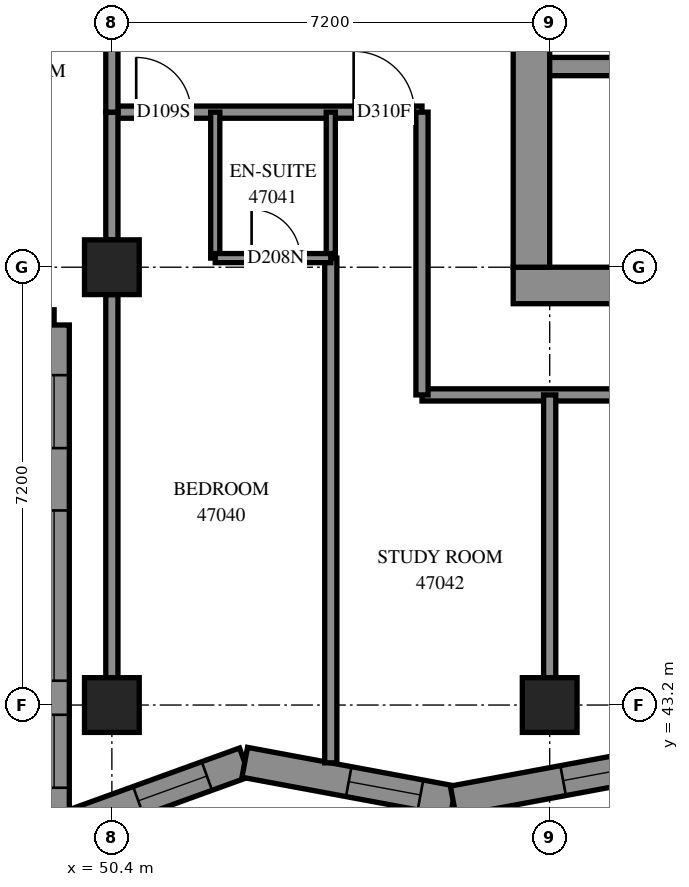
"""IFC4 building model, lengths in metres.
Left out: names, types, materials, properties, quantities, classifications, styles, units other than length and angle.
Written with IfcOpenShell. Run it as: python <this file> out.ifc"""

import sys

from ifc_helpers import new_model, si_unit, direction, frame, frame_2d, origin, origin_2d, place, context, subcontext, project, spatial, polyline, rectangle, outline, extrude, element, fill, save


model = new_model("IFC4")
c1 = context("Model", 3, precision=1e-05, world=origin(), true_north=direction((0.0, 1.0)))
c2 = subcontext(c1, "Body", "Model", "MODEL_VIEW")
j1 = project(units=[si_unit("LENGTHUNIT", "METRE"), si_unit("PLANEANGLEUNIT", "RADIAN")], contexts=[c1])
p1 = place(None, origin())
s1 = spatial("IfcSite", under=j1, at=p1, CompositionType="ELEMENT")
p2 = place(p1, origin())
s2 = spatial("IfcBuilding", under=s1, at=p2, CompositionType="ELEMENT")
p3 = place(p2, frame((0.0, 0.0, 172.8)))
s3 = spatial("IfcBuildingStorey", under=s2, at=p3, CompositionType="ELEMENT", Elevation=172.8)
for number, where, z_axis, x_axis in (
    (1, (50.4, 43.2, 0.0), (0.0, 0.0, 1.0), (1.0, 0.0, 0.0)),
    (2, (50.4, 50.4, 0.0), (0.0, 0.0, 1.0), (1.0, 0.0, 0.0)),
    (3, (57.6, 43.2, 0.0), (0.0, 0.0, 1.0), (1.0, 0.0, 0.0)),
):
    element("IfcColumn", number, at=place(p3, frame(where, z_axis=z_axis, x_axis=x_axis)), inside=s3, PredefinedType="COLUMN", context=c2, shape_type="SweptSolid", body=[
        extrude(rectangle(XDim=0.9, YDim=0.9, at=origin_2d()), origin(), (0.0, 0.0, 1.0), 3.1),
    ])
p4 = place(p3, frame((57.0, 50.1, -0.3), z_axis=(0.0, 0.0, 1.0), x_axis=(1.0, 0.0, 0.0)))
e4 = element("IfcWall", 4, at=p4, inside=s3, PredefinedType="SHEAR", context=c2, shape_type="SweptSolid", body=[
    extrude(rectangle(XDim=15.6, YDim=0.6, at=frame_2d((7.8, 0.0))), origin(), (0.0, 0.0, 1.0), 2.7),
])
p5 = place(p3, frame((57.3, 50.4, -0.3), z_axis=(0.0, 0.0, 1.0), x_axis=(0.0, 1.0, 0.0)))
e5 = element("IfcWall", 5, at=p5, inside=s3, PredefinedType="SHEAR", context=c2, shape_type="SweptSolid", body=[
    extrude(rectangle(XDim=14.4, YDim=0.6, at=frame_2d((7.2, 0.0))), origin(), (0.0, 0.0, 1.0), 2.7),
])
p6 = place(p5, frame((4.55, 0.0, 0.3)))
e6 = element("IfcOpeningElement", 6, at=p6, cuts=e5, PredefinedType="OPENING", context=c2, shape_type="SweptSolid", body=[
    extrude(rectangle(XDim=1.1, YDim=2.1, at=frame_2d((0.55, 1.05))), frame((0.0, 0.31, 0.0), z_axis=(0.0, -1.0, 0.0), x_axis=(1.0, 0.0, 0.0)), (0.0, 0.0, 1.0), 0.62),
])
p7 = place(p5, frame((11.35, 0.0, 0.3)))
e7 = element("IfcOpeningElement", 7, at=p7, cuts=e5, PredefinedType="OPENING", context=c2, shape_type="SweptSolid", body=[
    extrude(rectangle(XDim=1.1, YDim=2.1, at=frame_2d((0.55, 1.05))), frame((0.0, 0.31, 0.0), z_axis=(0.0, -1.0, 0.0), x_axis=(1.0, 0.0, 0.0)), (0.0, 0.0, 1.0), 0.62),
])
p8 = place(p3, frame((57.6, 53.7, 0.0), z_axis=(0.0, 0.0, 1.0), x_axis=(1.0, 0.0, 0.0)))
e8 = element("IfcWall", 8, at=p8, inside=s3, PredefinedType="SOLIDWALL", context=c2, shape_type="SweptSolid", body=[
    extrude(rectangle(XDim=14.4, YDim=0.3, at=frame_2d((7.2, 0.0))), origin(), (0.0, 0.0, 1.0), 3.1),
])
p9 = place(p8, frame((1.35, 0.0, 0.0)))
e9 = element("IfcOpeningElement", 9, at=p9, cuts=e8, PredefinedType="OPENING", context=c2, shape_type="SweptSolid", body=[
    extrude(rectangle(XDim=0.9, YDim=2.1, at=frame_2d((0.45, 1.05))), frame((0.0, 0.16, 0.0), z_axis=(0.0, -1.0, 0.0), x_axis=(1.0, 0.0, 0.0)), (0.0, 0.0, 1.0), 0.32),
])
p10 = place(p8, frame((4.95, 0.0, 0.0)))
e10 = element("IfcOpeningElement", 10, at=p10, cuts=e8, PredefinedType="OPENING", context=c2, shape_type="SweptSolid", body=[
    extrude(rectangle(XDim=0.9, YDim=2.1, at=frame_2d((0.45, 1.05))), frame((0.0, 0.16, 0.0), z_axis=(0.0, -1.0, 0.0), x_axis=(1.0, 0.0, 0.0)), (0.0, 0.0, 1.0), 0.32),
])
p11 = place(p8, frame((8.55, 0.0, 0.0)))
e11 = element("IfcOpeningElement", 11, at=p11, cuts=e8, PredefinedType="OPENING", context=c2, shape_type="SweptSolid", body=[
    extrude(rectangle(XDim=0.9, YDim=2.1, at=frame_2d((0.45, 1.05))), frame((0.0, 0.16, 0.0), z_axis=(0.0, -1.0, 0.0), x_axis=(1.0, 0.0, 0.0)), (0.0, 0.0, 1.0), 0.32),
])
p12 = place(p8, frame((12.05, 0.0, 0.0)))
e12 = element("IfcOpeningElement", 12, at=p12, cuts=e8, PredefinedType="OPENING", context=c2, shape_type="SweptSolid", body=[
    extrude(rectangle(XDim=1.1, YDim=2.1, at=frame_2d((0.55, 1.05))), frame((0.0, 0.16, 0.0), z_axis=(0.0, -1.0, 0.0), x_axis=(1.0, 0.0, 0.0)), (0.0, 0.0, 1.0), 0.32),
])
p13 = place(p3, frame((42.25, 49.45, 0.0), z_axis=(0.0, 0.0, 1.0), x_axis=(1.0, 0.0, 0.0)))
e13 = element("IfcWall", 13, at=p13, inside=s3, PredefinedType="SOLIDWALL", context=c2, shape_type="SweptSolid", body=[
    extrude(outline(polyline([(-0.25, -0.25), (6.95, -0.25), (7.45, 0.25), (0.25, 0.25), (-0.25, -0.25)])), origin(), (0.0, 0.0, 1.0), 3.1),
])
p14 = place(p13, frame((1.35, 0.0, 0.45)))
e14 = element("IfcOpeningElement", 14, at=p14, cuts=e13, PredefinedType="OPENING", context=c2, shape_type="SweptSolid", body=[
    extrude(rectangle(XDim=2.8, YDim=2.5, at=frame_2d((1.4, 1.25))), frame((0.0, 0.26, 0.0), z_axis=(0.0, -1.0, 0.0), x_axis=(1.0, 0.0, 0.0)), (0.0, 0.0, 1.0), 0.52),
])
p15 = place(p13, frame((5.175, 0.0, 0.45)))
e15 = element("IfcOpeningElement", 15, at=p15, cuts=e13, PredefinedType="OPENING", context=c2, shape_type="SweptSolid", body=[
    extrude(rectangle(XDim=1.2, YDim=2.5, at=frame_2d((0.6, 1.25))), frame((0.0, 0.26, 0.0), z_axis=(0.0, -1.0, 0.0), x_axis=(1.0, 0.0, 0.0)), (0.0, 0.0, 1.0), 0.52),
])
p16 = place(p3, frame((49.45, 49.45, 0.0), z_axis=(0.0, 0.0, 1.0), x_axis=(0.0, -1.0, 0.0)))
e16 = element("IfcWall", 16, at=p16, inside=s3, PredefinedType="SOLIDWALL", context=c2, shape_type="SweptSolid", body=[
    extrude(outline(polyline([(0.25, -0.25), (8.683, -0.25), (7.97, 0.25), (-0.25, 0.25), (0.25, -0.25)])), origin(), (0.0, 0.0, 1.0), 3.1),
])
p17 = place(p16, frame((3.05, 0.0, 0.45)))
e17 = element("IfcOpeningElement", 17, at=p17, cuts=e16, PredefinedType="OPENING", context=c2, shape_type="SweptSolid", body=[
    extrude(rectangle(XDim=2.8, YDim=2.5, at=frame_2d((1.4, 1.25))), frame((0.0, 0.26, 0.0), z_axis=(0.0, -1.0, 0.0), x_axis=(1.0, 0.0, 0.0)), (0.0, 0.0, 1.0), 0.52),
])
p18 = place(p16, frame((0.825, 0.0, 0.45)))
e18 = element("IfcOpeningElement", 18, at=p18, cuts=e16, PredefinedType="OPENING", context=c2, shape_type="SweptSolid", body=[
    extrude(rectangle(XDim=1.2, YDim=2.5, at=frame_2d((0.6, 1.25))), frame((0.0, 0.26, 0.0), z_axis=(0.0, -1.0, 0.0), x_axis=(1.0, 0.0, 0.0)), (0.0, 0.0, 1.0), 0.52),
])
p19 = place(p16, frame((6.41, 0.0, 0.45)))
e19 = element("IfcOpeningElement", 19, at=p19, cuts=e16, PredefinedType="OPENING", context=c2, shape_type="SweptSolid", body=[
    extrude(rectangle(XDim=1.2, YDim=2.5, at=frame_2d((0.6, 1.25))), frame((0.0, 0.26, 0.0), z_axis=(0.0, -1.0, 0.0), x_axis=(1.0, 0.0, 0.0)), (0.0, 0.0, 1.0), 0.52),
])
p20 = place(p3, frame((49.45, 41.123, 0.0), z_axis=(0.0, 0.0, 1.0), x_axis=(0.9402933257, 0.3403651885, 0.0)))
e20 = element("IfcWall", 20, at=p20, inside=s3, PredefinedType="SOLIDWALL", context=c2, shape_type="SweptSolid", body=[
    extrude(outline(polyline([(-0.356, -0.25), (3.266, -0.25), (3.402, 0.25), (0.356, 0.25), (-0.356, -0.25)])), origin(), (0.0, 0.0, 1.0), 3.1),
])
p21 = place(p20, frame((1.472, 0.0, 0.45)))
e21 = element("IfcOpeningElement", 21, at=p21, cuts=e20, PredefinedType="OPENING", context=c2, shape_type="SweptSolid", body=[
    extrude(rectangle(XDim=1.2, YDim=2.5, at=frame_2d((0.6, 1.25))), frame((0.0, 0.26, 0.0), z_axis=(0.0, -1.0, 0.0), x_axis=(1.0, 0.0, 0.0)), (0.0, 0.0, 1.0), 0.52),
])
p22 = place(p3, frame((52.585, 42.258, 0.0), z_axis=(0.0, 0.0, 1.0), x_axis=(0.9831690143, -0.182698356, 0.0)))
e22 = element("IfcWall", 22, at=p22, inside=s3, PredefinedType="SOLIDWALL", context=c2, shape_type="SweptSolid", body=[
    extrude(outline(polyline([(0.068, -0.25), (3.533, -0.25), (3.44, 0.25), (-0.068, 0.25), (0.068, -0.25)])), origin(), (0.0, 0.0, 1.0), 3.1),
])
p23 = place(p22, frame((1.739, 0.0, 0.45)))
e23 = element("IfcOpeningElement", 23, at=p23, cuts=e22, PredefinedType="OPENING", context=c2, shape_type="SweptSolid", body=[
    extrude(rectangle(XDim=1.2, YDim=2.5, at=frame_2d((0.6, 1.25))), frame((0.0, 0.26, 0.0), z_axis=(0.0, -1.0, 0.0), x_axis=(1.0, 0.0, 0.0)), (0.0, 0.0, 1.0), 0.52),
])
p24 = place(p3, frame((56.012, 41.621, 0.0), z_axis=(0.0, 0.0, 1.0), x_axis=(0.9831660022, 0.1827145649, 0.0)))
e24 = element("IfcWall", 24, at=p24, inside=s3, PredefinedType="SOLIDWALL", context=c2, shape_type="SweptSolid", body=[
    extrude(outline(polyline([(-0.046, -0.25), (3.418, -0.25), (3.511, 0.25), (0.046, 0.25), (-0.046, -0.25)])), origin(), (0.0, 0.0, 1.0), 3.1),
])
p25 = place(p24, frame((1.84, 0.0, 0.45)))
e25 = element("IfcOpeningElement", 25, at=p25, cuts=e24, PredefinedType="OPENING", context=c2, shape_type="SweptSolid", body=[
    extrude(rectangle(XDim=1.2, YDim=2.5, at=frame_2d((0.6, 1.25))), frame((0.0, 0.26, 0.0), z_axis=(0.0, -1.0, 0.0), x_axis=(1.0, 0.0, 0.0)), (0.0, 0.0, 1.0), 0.52),
])
p26 = place(p3, frame((55.5, 48.3, 0.0), z_axis=(0.0, 0.0, 1.0), x_axis=(1.0, 0.0, 0.0)))
e26 = element("IfcWall", 26, at=p26, inside=s3, PredefinedType="PARTITIONING", context=c2, shape_type="SweptSolid", body=[
    extrude(rectangle(XDim=18.974, YDim=0.2, at=frame_2d((9.487, 0.0))), origin(), (0.0, 0.0, 1.0), 3.1),
])
p27 = place(p26, frame((5.963, 0.0, 0.0)))
e27 = element("IfcOpeningElement", 27, at=p27, cuts=e26, PredefinedType="OPENING", context=c2, shape_type="SweptSolid", body=[
    extrude(rectangle(XDim=1.0, YDim=2.1, at=frame_2d((0.5, 1.05))), frame((0.0, 0.11, 0.0), z_axis=(0.0, -1.0, 0.0), x_axis=(1.0, 0.0, 0.0)), (0.0, 0.0, 1.0), 0.22),
])
p28 = place(p26, frame((13.161, 0.0, 0.0)))
e28 = element("IfcOpeningElement", 28, at=p28, cuts=e26, PredefinedType="OPENING", context=c2, shape_type="SweptSolid", body=[
    extrude(rectangle(XDim=0.9, YDim=2.1, at=frame_2d((0.45, 1.05))), frame((0.0, 0.11, 0.0), z_axis=(0.0, -1.0, 0.0), x_axis=(1.0, 0.0, 0.0)), (0.0, 0.0, 1.0), 0.22),
])
p29 = place(p3, frame((54.0, 42.249, 0.0), z_axis=(0.0, 0.0, 1.0), x_axis=(0.0, 1.0, 0.0)))
e29 = element("IfcWall", 29, at=p29, inside=s3, PredefinedType="PARTITIONING", context=c2, shape_type="SweptSolid", body=[
    extrude(rectangle(XDim=8.3, YDim=0.2, at=frame_2d((4.15, 0.0))), origin(), (0.0, 0.0, 1.0), 3.1),
])
p30 = place(p3, frame((50.4, 43.65, 0.0), z_axis=(0.0, 0.0, 1.0), x_axis=(0.0, 1.0, 0.0)))
e30 = element("IfcWall", 30, at=p30, inside=s3, PredefinedType="PARTITIONING", context=c2, shape_type="SweptSolid", body=[
    extrude(rectangle(XDim=6.3, YDim=0.2, at=frame_2d((3.15, 0.0))), origin(), (0.0, 0.0, 1.0), 2.6),
])
p31 = place(p3, frame((50.4, 52.95, 0.0), z_axis=(0.0, 0.0, 1.0), x_axis=(1.0, 0.0, 0.0)))
e31 = element("IfcWall", 31, at=p31, inside=s3, PredefinedType="PARTITIONING", context=c2, shape_type="SweptSolid", body=[
    extrude(rectangle(XDim=5.1, YDim=0.2, at=frame_2d((2.55, 0.0))), origin(), (0.0, 0.0, 1.0), 3.1),
])
p32 = place(p31, frame((0.4, 0.0, 0.0)))
e32 = element("IfcOpeningElement", 32, at=p32, cuts=e31, PredefinedType="OPENING", context=c2, shape_type="SweptSolid", body=[
    extrude(rectangle(XDim=0.9, YDim=2.1, at=frame_2d((0.45, 1.05))), frame((0.0, 0.11, 0.0), z_axis=(0.0, -1.0, 0.0), x_axis=(1.0, 0.0, 0.0)), (0.0, 0.0, 1.0), 0.22),
])
p33 = place(p31, frame((3.976, 0.0, 0.0)))
e33 = element("IfcOpeningElement", 33, at=p33, cuts=e31, PredefinedType="OPENING", context=c2, shape_type="SweptSolid", body=[
    extrude(rectangle(XDim=1.0, YDim=2.1, at=frame_2d((0.5, 1.05))), frame((0.0, 0.11, 0.0), z_axis=(0.0, -1.0, 0.0), x_axis=(1.0, 0.0, 0.0)), (0.0, 0.0, 1.0), 0.22),
])
for number, where, z_axis, x_axis in (
    (34, (55.5, 48.3, 0.0), (0.0, 0.0, 1.0), (0.0, 1.0, 0.0)),
    (35, (57.6, 43.65, 0.0), (0.0, 0.0, 1.0), (0.0, 1.0, 0.0)),
):
    element("IfcWall", number, at=place(p3, frame(where, z_axis=z_axis, x_axis=x_axis)), inside=s3, PredefinedType="PARTITIONING", context=c2, shape_type="SweptSolid", body=[
        extrude(rectangle(XDim=4.65, YDim=0.2, at=frame_2d((2.325, 0.0))), origin(), (0.0, 0.0, 1.0), 3.1),
    ])
for number, where, z_axis, x_axis in (
    (36, (52.1, 50.55, 0.0), (0.0, 0.0, 1.0), (0.0, 1.0, 0.0)),
    (37, (54.0, 50.55, 0.0), (0.0, 0.0, 1.0), (0.0, 1.0, 0.0)),
):
    element("IfcWall", number, at=place(p3, frame(where, z_axis=z_axis, x_axis=x_axis)), inside=s3, PredefinedType="PARTITIONING", context=c2, shape_type="SweptSolid", body=[
        extrude(rectangle(XDim=2.4, YDim=0.15, at=frame_2d((1.2, 0.0))), origin(), (0.0, 0.0, 1.0), 3.1),
    ])
for number, where, z_axis, x_axis in (
    (38, (50.4, 50.85, 0.0), (0.0, 0.0, 1.0), (0.0, 1.0, 0.0)),
    (39, (50.4, 52.95, 0.0), (0.0, 0.0, 1.0), (0.0, 1.0, 0.0)),
):
    element("IfcWall", number, at=place(p3, frame(where, z_axis=z_axis, x_axis=x_axis)), inside=s3, PredefinedType="PARTITIONING", context=c2, shape_type="SweptSolid", body=[
        extrude(rectangle(XDim=2.1, YDim=0.2, at=frame_2d((1.05, 0.0))), origin(), (0.0, 0.0, 1.0), 3.1),
    ])
p34 = place(p3, frame((52.1, 50.55, 0.0), z_axis=(0.0, 0.0, 1.0), x_axis=(1.0, 0.0, 0.0)))
e40 = element("IfcWall", 40, at=p34, inside=s3, PredefinedType="PARTITIONING", context=c2, shape_type="SweptSolid", body=[
    extrude(rectangle(XDim=1.9, YDim=0.15, at=frame_2d((0.95, 0.0))), origin(), (0.0, 0.0, 1.0), 3.1),
])
p35 = place(p34, frame((0.598, 0.0, 0.0)))
e41 = element("IfcOpeningElement", 41, at=p35, cuts=e40, PredefinedType="OPENING", context=c2, shape_type="SweptSolid", body=[
    extrude(rectangle(XDim=0.8, YDim=2.1, at=frame_2d((0.4, 1.05))), frame((0.0, 0.085, 0.0), z_axis=(0.0, -1.0, 0.0), x_axis=(1.0, 0.0, 0.0)), (0.0, 0.0, 1.0), 0.17),
])
p36 = place(p17, origin())
e42 = element("IfcWindow", 42, at=p36, inside=s3, PartitioningType="SINGLE_PANEL", PredefinedType="WINDOW", context=c2, shape_type="SweptSolid", body=[
    extrude(rectangle(XDim=2.8, YDim=2.5, at=frame_2d((1.4, 1.25))), frame((0.0, 0.18, 0.0), z_axis=(0.0, -1.0, 0.0), x_axis=(1.0, 0.0, 0.0)), (0.0, 0.0, 1.0), 0.06),
])
fill(e17, e42)
p37 = place(p18, origin())
e43 = element("IfcWindow", 43, at=p37, inside=s3, PartitioningType="SINGLE_PANEL", PredefinedType="WINDOW", context=c2, shape_type="SweptSolid", body=[
    extrude(rectangle(XDim=1.2, YDim=2.5, at=frame_2d((0.6, 1.25))), frame((0.0, 0.18, 0.0), z_axis=(0.0, -1.0, 0.0), x_axis=(1.0, 0.0, 0.0)), (0.0, 0.0, 1.0), 0.06),
])
fill(e18, e43)
p38 = place(p19, origin())
e44 = element("IfcWindow", 44, at=p38, inside=s3, PartitioningType="SINGLE_PANEL", PredefinedType="WINDOW", context=c2, shape_type="SweptSolid", body=[
    extrude(rectangle(XDim=1.2, YDim=2.5, at=frame_2d((0.6, 1.25))), frame((0.0, 0.18, 0.0), z_axis=(0.0, -1.0, 0.0), x_axis=(1.0, 0.0, 0.0)), (0.0, 0.0, 1.0), 0.06),
])
fill(e19, e44)
p39 = place(p21, origin())
e45 = element("IfcWindow", 45, at=p39, inside=s3, PartitioningType="SINGLE_PANEL", PredefinedType="WINDOW", context=c2, shape_type="SweptSolid", body=[
    extrude(rectangle(XDim=1.2, YDim=2.5, at=frame_2d((0.6, 1.25))), frame((0.0, 0.18, 0.0), z_axis=(0.0, -1.0, 0.0), x_axis=(1.0, 0.0, 0.0)), (0.0, 0.0, 1.0), 0.06),
])
fill(e21, e45)
p40 = place(p23, origin())
e46 = element("IfcWindow", 46, at=p40, inside=s3, PartitioningType="SINGLE_PANEL", PredefinedType="WINDOW", context=c2, shape_type="SweptSolid", body=[
    extrude(rectangle(XDim=1.2, YDim=2.5, at=frame_2d((0.6, 1.25))), frame((0.0, 0.18, 0.0), z_axis=(0.0, -1.0, 0.0), x_axis=(1.0, 0.0, 0.0)), (0.0, 0.0, 1.0), 0.06),
])
fill(e23, e46)
p41 = place(p25, origin())
e47 = element("IfcWindow", 47, at=p41, inside=s3, PartitioningType="SINGLE_PANEL", PredefinedType="WINDOW", context=c2, shape_type="SweptSolid", body=[
    extrude(rectangle(XDim=1.2, YDim=2.5, at=frame_2d((0.6, 1.25))), frame((0.0, 0.18, 0.0), z_axis=(0.0, -1.0, 0.0), x_axis=(1.0, 0.0, 0.0)), (0.0, 0.0, 1.0), 0.06),
])
fill(e25, e47)
p42 = place(p32, origin())
e48 = element("IfcDoor", 48, at=p42, inside=s3, OperationType="SINGLE_SWING_LEFT", PredefinedType="DOOR", context=c2, shape_type="SweptSolid", body=[
    extrude(rectangle(XDim=0.9, YDim=2.1, at=frame_2d((0.45, 1.05))), frame((0.0, 0.025, 0.0), z_axis=(0.0, -1.0, 0.0), x_axis=(1.0, 0.0, 0.0)), (0.0, 0.0, 1.0), 0.05),
])
fill(e32, e48)
p43 = place(p35, origin())
e49 = element("IfcDoor", 49, at=p43, inside=s3, OperationType="SINGLE_SWING_RIGHT", PredefinedType="DOOR", context=c2, shape_type="SweptSolid", body=[
    extrude(rectangle(XDim=0.8, YDim=2.1, at=frame_2d((0.4, 1.05))), frame((0.0, 0.025, 0.0), z_axis=(0.0, -1.0, 0.0), x_axis=(1.0, 0.0, 0.0)), (0.0, 0.0, 1.0), 0.05),
])
fill(e41, e49)
p44 = place(p33, origin())
e50 = element("IfcDoor", 50, at=p44, inside=s3, OperationType="SINGLE_SWING_RIGHT", PredefinedType="DOOR", context=c2, shape_type="SweptSolid", body=[
    extrude(rectangle(XDim=1.0, YDim=2.1, at=frame_2d((0.5, 1.05))), frame((0.0, 0.025, 0.0), z_axis=(0.0, -1.0, 0.0), x_axis=(1.0, 0.0, 0.0)), (0.0, 0.0, 1.0), 0.05),
])
fill(e33, e50)
save(model, sys.argv[1])
